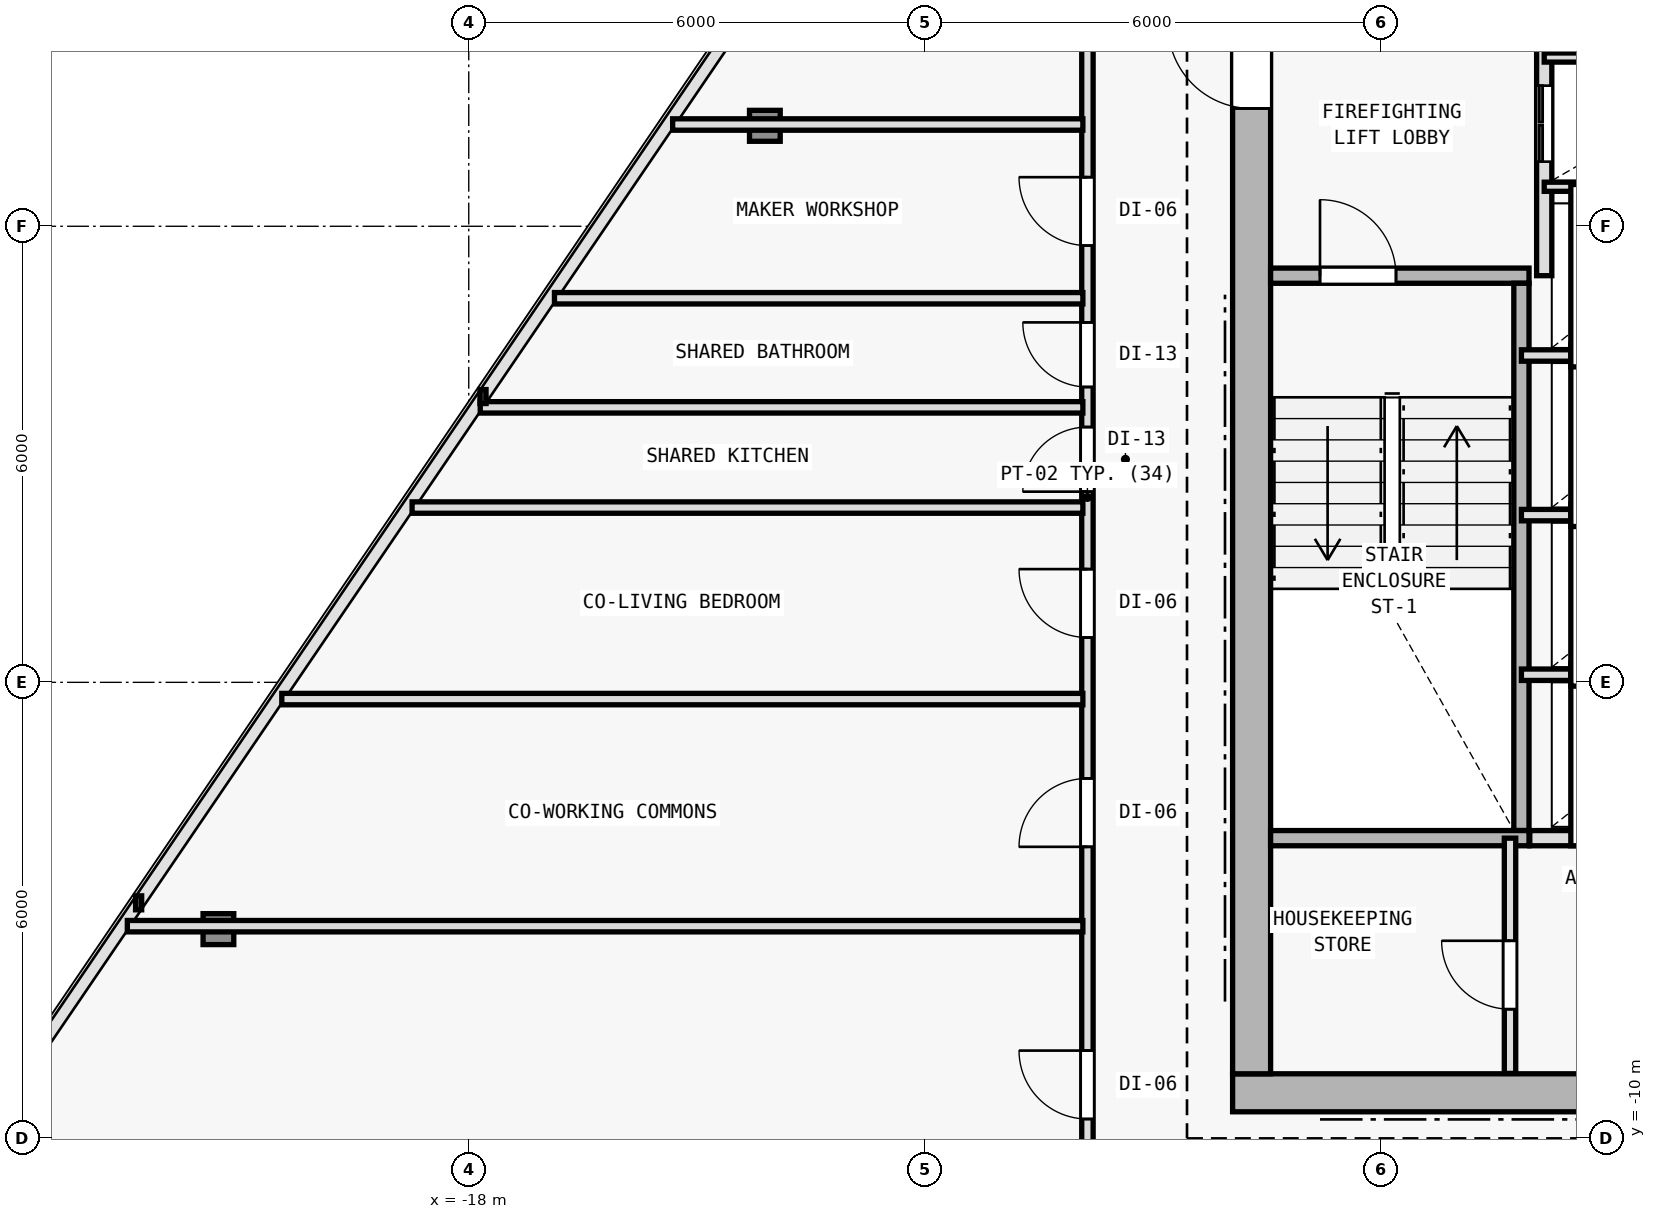
"""IFC4 building model, lengths in metres.
Left out: names, types, materials, properties, quantities, classifications, styles, units other than length and angle.
Written with IfcOpenShell. Run it as: python <this file> out.ifc"""

import sys

from ifc_helpers import new_model, si_unit, direction, frame, frame_2d, origin, origin_2d, place, context, subcontext, project, spatial, rectangle, i_section, extrude, element, fill, save


model = new_model("IFC4")
c1 = context("Model", 3, precision=1e-05, world=origin(), true_north=direction((0.0, 1.0)))
c2 = subcontext(c1, "Body", "Model", "MODEL_VIEW")
j1 = project(units=[si_unit("LENGTHUNIT", "METRE"), si_unit("PLANEANGLEUNIT", "RADIAN")], contexts=[c1])
p1 = place(None, origin())
s1 = spatial("IfcSite", under=j1, at=p1, CompositionType="ELEMENT")
p2 = place(p1, origin())
s2 = spatial("IfcBuilding", under=s1, at=p2, CompositionType="ELEMENT")
p3 = place(p2, frame((0.0, 0.0, 153.0)))
s3 = spatial("IfcBuildingStorey", under=s2, at=p3, CompositionType="ELEMENT", Elevation=153.0)
for number, where, z_axis, x_axis in (
    (1, (-7.7, -9.4, 0.0), (0.0, 0.0, 1.0), (1.0, 0.0, 0.0)),
    (2, (-7.7, 2.0, 0.0), (0.0, 0.0, 1.0), (1.0, 0.0, 0.0)),
):
    element("IfcColumn", number, at=place(p3, frame(where, z_axis=z_axis, x_axis=x_axis)), inside=s3, PredefinedType="COLUMN", context=c2, shape_type="SweptSolid", body=[
        extrude(i_section(OverallWidth=0.404, OverallDepth=0.407, WebThickness=0.017, FlangeThickness=0.028, FilletRadius=0.015, at=origin_2d()), origin(), (0.0, 0.0, 1.0), 3.6),
    ])
p4 = place(p3, frame((-14.104, 3.322, 0.006), z_axis=(0.017003572908, 0.009522000828, 0.999810086971), x_axis=(-0.488603368932, 0.87250601595, 0.0)))
e3 = element("IfcColumn", 3, at=p4, inside=s3, PredefinedType="COLUMN", context=c2, shape_type="SweptSolid", body=[
    extrude(i_section(OverallWidth=0.404, OverallDepth=0.407, WebThickness=0.017, FlangeThickness=0.028, FilletRadius=0.015, at=origin_2d()), origin(), (0.0, 0.0, 1.0), 3.59),
])
p5 = place(p3, frame((-21.294, -7.247, 0.006), z_axis=(0.025292109804, 0.02162067451, 0.999446274502), x_axis=(-0.649781149204, 0.760121344352, 0.0)))
e4 = element("IfcColumn", 4, at=p5, inside=s3, PredefinedType="COLUMN", context=c2, shape_type="SweptSolid", body=[
    extrude(i_section(OverallWidth=0.404, OverallDepth=0.407, WebThickness=0.017, FlangeThickness=0.028, FilletRadius=0.015, at=origin_2d()), origin(), (0.0, 0.0, 1.0), 3.591),
])
p6 = place(p3, frame((-7.95, -9.4, 0.0), z_axis=(0.0, 0.0, 1.0), x_axis=(1.0, 0.0, 0.0)))
e5 = element("IfcWall", 5, at=p6, inside=s3, PredefinedType="SHEAR", context=c2, shape_type="SweptSolid", body=[
    extrude(rectangle(XDim=15.9, YDim=0.5, at=frame_2d((7.95, 0.0))), origin(), (0.0, 0.0, 1.0), 3.35),
])
p7 = place(p6, frame((9.6, 0.0, 0.0)))
e6 = element("IfcOpeningElement", 6, at=p7, cuts=e5, PredefinedType="OPENING", context=c2, shape_type="SweptSolid", body=[
    extrude(rectangle(XDim=1.5, YDim=2.2, at=frame_2d((0.75, 1.1))), frame((0.0, 0.26, 0.0), z_axis=(0.0, -1.0, 0.0), x_axis=(1.0, 0.0, 0.0)), (0.0, 0.0, 1.0), 0.52),
])
p8 = place(p3, frame((-7.7, -9.15, 0.0), z_axis=(0.0, 0.0, 1.0), x_axis=(0.0, 1.0, 0.0)))
e7 = element("IfcWall", 7, at=p8, inside=s3, PredefinedType="SHEAR", context=c2, shape_type="SweptSolid", body=[
    extrude(rectangle(XDim=19.1, YDim=0.5, at=frame_2d((9.55, 0.0))), origin(), (0.0, 0.0, 1.0), 3.35),
])
p9 = place(p8, frame((12.7, 0.0, 0.0)))
e8 = element("IfcOpeningElement", 8, at=p9, cuts=e7, PredefinedType="OPENING", context=c2, shape_type="SweptSolid", body=[
    extrude(rectangle(XDim=1.1, YDim=2.15, at=frame_2d((0.55, 1.075))), frame((0.0, 0.26, 0.0), z_axis=(0.0, -1.0, 0.0), x_axis=(1.0, 0.0, 0.0)), (0.0, 0.0, 1.0), 0.52),
])
p10 = place(p3, frame((-7.45, 1.35, 0.0), z_axis=(0.0, 0.0, 1.0), x_axis=(1.0, 0.0, 0.0)))
e9 = element("IfcWall", 9, at=p10, inside=s3, PredefinedType="SOLIDWALL", context=c2, shape_type="SweptSolid", body=[
    extrude(rectangle(XDim=3.4, YDim=0.2, at=frame_2d((1.7, 0.0))), origin(), (0.0, 0.0, 1.0), 3.35),
])
p11 = place(p10, frame((0.65, 0.0, 0.0)))
e10 = element("IfcOpeningElement", 10, at=p11, cuts=e9, PredefinedType="OPENING", context=c2, shape_type="SweptSolid", body=[
    extrude(rectangle(XDim=1.0, YDim=2.15, at=frame_2d((0.5, 1.075))), frame((0.0, 0.11, 0.0), z_axis=(0.0, -1.0, 0.0), x_axis=(1.0, 0.0, 0.0)), (0.0, 0.0, 1.0), 0.22),
])
p12 = place(p3, frame((-4.15, -5.95, 0.0), z_axis=(0.0, 0.0, 1.0), x_axis=(0.0, 1.0, 0.0)))
e11 = element("IfcWall", 11, at=p12, inside=s3, PredefinedType="SOLIDWALL", context=c2, shape_type="SweptSolid", body=[
    extrude(rectangle(XDim=7.2, YDim=0.2, at=frame_2d((3.6, 0.0))), origin(), (0.0, 0.0, 1.0), 3.35),
])
p13 = place(p3, frame((-3.85, 1.35, 0.0), z_axis=(0.0, 0.0, 1.0), x_axis=(0.0, 1.0, 0.0)))
e12 = element("IfcWall", 12, at=p13, inside=s3, PredefinedType="SOLIDWALL", context=c2, shape_type="SweptSolid", body=[
    extrude(rectangle(XDim=8.595, YDim=0.2, at=frame_2d((4.297, 0.0))), origin(), (0.0, 0.0, 1.0), 3.35),
])
p14 = place(p13, frame((1.5, 0.0, 0.0)))
e13 = element("IfcOpeningElement", 13, at=p14, cuts=e12, PredefinedType="OPENING", context=c2, shape_type="SweptSolid", body=[
    extrude(rectangle(XDim=1.0, YDim=2.15, at=frame_2d((0.5, 1.075))), frame((0.0, 0.11, 0.0), z_axis=(0.0, -1.0, 0.0), x_axis=(1.0, 0.0, 0.0)), (0.0, 0.0, 1.0), 0.22),
])
p15 = place(p13, frame((3.18, 0.0, 0.0)))
e14 = element("IfcOpeningElement", 14, at=p15, cuts=e12, PredefinedType="OPENING", context=c2, shape_type="SweptSolid", body=[
    extrude(rectangle(XDim=1.0, YDim=2.15, at=frame_2d((0.5, 1.075))), frame((0.0, 0.11, 0.0), z_axis=(0.0, -1.0, 0.0), x_axis=(1.0, 0.0, 0.0)), (0.0, 0.0, 1.0), 0.22),
])
for number, where, z_axis, x_axis in (
    (15, (-3.85, 2.52, 0.0), (0.0, 0.0, 1.0), (1.0, 0.0, 0.0)),
    (16, (-3.85, 4.22, 0.0), (0.0, 0.0, 1.0), (1.0, 0.0, 0.0)),
):
    element("IfcWall", number, at=place(p3, frame(where, z_axis=z_axis, x_axis=x_axis)), inside=s3, PredefinedType="PARTITIONING", context=c2, shape_type="SweptSolid", body=[
        extrude(rectangle(XDim=2.9, YDim=0.12, at=frame_2d((1.45, 0.0))), origin(), (0.0, 0.0, 1.0), 3.35),
    ])
for number, where, z_axis, x_axis in (
    (17, (-4.15, -3.9, 0.0), (0.0, 0.0, 1.0), (1.0, 0.0, 0.0)),
    (18, (-4.15, -1.8, 0.0), (0.0, 0.0, 1.0), (1.0, 0.0, 0.0)),
    (19, (-4.15, 0.3, 0.0), (0.0, 0.0, 1.0), (1.0, 0.0, 0.0)),
):
    element("IfcWall", number, at=place(p3, frame(where, z_axis=z_axis, x_axis=x_axis)), inside=s3, PredefinedType="PARTITIONING", context=c2, shape_type="SweptSolid", body=[
        extrude(rectangle(XDim=2.9, YDim=0.15, at=frame_2d((1.45, 0.0))), origin(), (0.0, 0.0, 1.0), 3.35),
    ])
p16 = place(p3, frame((-7.45, -6.05, 0.0), z_axis=(0.0, 0.0, 1.0), x_axis=(1.0, 0.0, 0.0)))
e20 = element("IfcWall", 20, at=p16, inside=s3, PredefinedType="SOLIDWALL", context=c2, shape_type="SweptSolid", body=[
    extrude(rectangle(XDim=3.4, YDim=0.2, at=frame_2d((1.7, 0.0))), origin(), (0.0, 0.0, 1.0), 3.35),
])
p17 = place(p3, frame((-4.04, -6.05, 0.0), z_axis=(0.0, 0.0, 1.0), x_axis=(1.0, 0.0, 0.0)))
e21 = element("IfcWall", 21, at=p17, inside=s3, PredefinedType="SOLIDWALL", context=c2, shape_type="SweptSolid", body=[
    extrude(rectangle(XDim=2.79, YDim=0.2, at=frame_2d((1.395, 0.0))), origin(), (0.0, 0.0, 1.0), 3.35),
])
p18 = place(p3, frame((-4.3, -9.145, 0.0), z_axis=(0.0, 0.0, 1.0), x_axis=(0.0, 1.0, 0.0)))
e22 = element("IfcWall", 22, at=p18, inside=s3, PredefinedType="PARTITIONING", context=c2, shape_type="SweptSolid", body=[
    extrude(rectangle(XDim=3.095, YDim=0.15, at=frame_2d((1.547, 0.0))), origin(), (0.0, 0.0, 1.0), 3.35),
])
p19 = place(p18, frame((0.845, 0.0, 0.0)))
e23 = element("IfcOpeningElement", 23, at=p19, cuts=e22, PredefinedType="OPENING", context=c2, shape_type="SweptSolid", body=[
    extrude(rectangle(XDim=0.9, YDim=2.1, at=frame_2d((0.45, 1.05))), frame((0.0, 0.085, 0.0), z_axis=(0.0, -1.0, 0.0), x_axis=(1.0, 0.0, 0.0)), (0.0, 0.0, 1.0), 0.17),
])
p20 = place(p3, frame((-9.86, -11.56, 0.0), z_axis=(0.0, 0.0, 1.0), x_axis=(0.0, 1.0, 0.0)))
e24 = element("IfcWall", 24, at=p20, inside=s3, PredefinedType="PARTITIONING", context=c2, shape_type="SweptSolid", body=[
    extrude(rectangle(XDim=19.986, YDim=0.15, at=frame_2d((9.993, 0.0))), origin(), (0.0, 0.0, 1.0), 2.775),
])
p21 = place(p20, frame((11.446, 0.0, 0.0)))
e25 = element("IfcOpeningElement", 25, at=p21, cuts=e24, PredefinedType="OPENING", context=c2, shape_type="SweptSolid", body=[
    extrude(rectangle(XDim=0.85, YDim=2.1, at=frame_2d((0.425, 1.05))), frame((0.0, 0.085, 0.0), z_axis=(0.0, -1.0, 0.0), x_axis=(1.0, 0.0, 0.0)), (0.0, 0.0, 1.0), 0.17),
])
p22 = place(p20, frame((10.069, 0.0, 0.0)))
e26 = element("IfcOpeningElement", 26, at=p22, cuts=e24, PredefinedType="OPENING", context=c2, shape_type="SweptSolid", body=[
    extrude(rectangle(XDim=0.85, YDim=2.1, at=frame_2d((0.425, 1.05))), frame((0.0, 0.085, 0.0), z_axis=(0.0, -1.0, 0.0), x_axis=(1.0, 0.0, 0.0)), (0.0, 0.0, 1.0), 0.17),
])
p23 = place(p20, frame((8.15, 0.0, 0.0)))
e27 = element("IfcOpeningElement", 27, at=p23, cuts=e24, PredefinedType="OPENING", context=c2, shape_type="SweptSolid", body=[
    extrude(rectangle(XDim=0.9, YDim=2.1, at=frame_2d((0.45, 1.05))), frame((0.0, 0.085, 0.0), z_axis=(0.0, -1.0, 0.0), x_axis=(1.0, 0.0, 0.0)), (0.0, 0.0, 1.0), 0.17),
])
p24 = place(p20, frame((5.396, 0.0, 0.0)))
e28 = element("IfcOpeningElement", 28, at=p24, cuts=e24, PredefinedType="OPENING", context=c2, shape_type="SweptSolid", body=[
    extrude(rectangle(XDim=0.9, YDim=2.1, at=frame_2d((0.45, 1.05))), frame((0.0, 0.085, 0.0), z_axis=(0.0, -1.0, 0.0), x_axis=(1.0, 0.0, 0.0)), (0.0, 0.0, 1.0), 0.17),
])
p25 = place(p20, frame((1.815, 0.0, 0.0)))
e29 = element("IfcOpeningElement", 29, at=p25, cuts=e24, PredefinedType="OPENING", context=c2, shape_type="SweptSolid", body=[
    extrude(rectangle(XDim=0.9, YDim=2.1, at=frame_2d((0.45, 1.05))), frame((0.0, 0.085, 0.0), z_axis=(0.0, -1.0, 0.0), x_axis=(1.0, 0.0, 0.0)), (0.0, 0.0, 1.0), 0.17),
])
p26 = place(p20, frame((13.306, 0.0, 0.0)))
e30 = element("IfcOpeningElement", 30, at=p26, cuts=e24, PredefinedType="OPENING", context=c2, shape_type="SweptSolid", body=[
    extrude(rectangle(XDim=0.9, YDim=2.1, at=frame_2d((0.45, 1.05))), frame((0.0, 0.085, 0.0), z_axis=(0.0, -1.0, 0.0), x_axis=(1.0, 0.0, 0.0)), (0.0, 0.0, 1.0), 0.17),
])
p27 = place(p3, frame((-9.92, 3.339, 0.0), z_axis=(0.0, 0.0, 1.0), x_axis=(-1.0, 0.0, 0.0)))
e31 = element("IfcWall", 31, at=p27, inside=s3, PredefinedType="PARTITIONING", context=c2, shape_type="SweptSolid", body=[
    extrude(rectangle(XDim=5.397, YDim=0.15, at=frame_2d((2.699, 0.0))), origin(), (0.0, 0.0, 1.0), 2.885),
])
p28 = place(p3, frame((-9.92, -7.208, 0.0), z_axis=(0.0, 0.0, 1.0), x_axis=(-1.0, 0.0, 0.0)))
e32 = element("IfcWall", 32, at=p28, inside=s3, PredefinedType="PARTITIONING", context=c2, shape_type="SweptSolid", body=[
    extrude(rectangle(XDim=12.572, YDim=0.15, at=frame_2d((6.286, 0.0))), origin(), (0.0, 0.0, 1.0), 2.775),
])
p29 = place(p3, frame((-9.92, -1.701, 0.0), z_axis=(0.0, 0.0, 1.0), x_axis=(-1.0, 0.0, 0.0)))
e33 = element("IfcWall", 33, at=p29, inside=s3, PredefinedType="PARTITIONING", context=c2, shape_type="SweptSolid", body=[
    extrude(rectangle(XDim=8.826, YDim=0.15, at=frame_2d((4.413, 0.0))), origin(), (0.0, 0.0, 1.0), 2.885),
])
p30 = place(p3, frame((-9.92, -4.22, 0.0), z_axis=(0.0, 0.0, 1.0), x_axis=(-1.0, 0.0, 0.0)))
e34 = element("IfcWall", 34, at=p30, inside=s3, PredefinedType="PARTITIONING", context=c2, shape_type="SweptSolid", body=[
    extrude(rectangle(XDim=10.54, YDim=0.15, at=frame_2d((5.27, 0.0))), origin(), (0.0, 0.0, 1.0), 2.885),
])
p31 = place(p3, frame((-9.92, 1.053, 0.0), z_axis=(0.0, 0.0, 1.0), x_axis=(-1.0, 0.0, 0.0)))
e35 = element("IfcWall", 35, at=p31, inside=s3, PredefinedType="PARTITIONING", context=c2, shape_type="SweptSolid", body=[
    extrude(rectangle(XDim=6.952, YDim=0.15, at=frame_2d((3.476, 0.0))), origin(), (0.0, 0.0, 1.0), 2.885),
])
p32 = place(p3, frame((-9.92, -0.382, 0.0), z_axis=(0.0, 0.0, 1.0), x_axis=(-0.999999999526, -3.0791969e-05, 0.0)))
e36 = element("IfcWall", 36, at=p32, inside=s3, PredefinedType="PARTITIONING", context=c2, shape_type="SweptSolid", body=[
    extrude(rectangle(XDim=7.929, YDim=0.15, at=frame_2d((3.964, 0.0))), origin(), (0.0, 0.0, 1.0), 2.885),
])
p33 = place(p9, origin())
e37 = element("IfcDoor", 37, at=p33, inside=s3, OperationType="SINGLE_SWING_RIGHT", PredefinedType="DOOR", context=c2, shape_type="SweptSolid", body=[
    extrude(rectangle(XDim=1.1, YDim=2.15, at=frame_2d((0.55, 1.075))), frame((0.0, 0.025, 0.0), z_axis=(0.0, -1.0, 0.0), x_axis=(1.0, 0.0, 0.0)), (0.0, 0.0, 1.0), 0.05),
])
fill(e8, e37)
p34 = place(p11, origin())
e38 = element("IfcDoor", 38, at=p34, inside=s3, OperationType="SINGLE_SWING_LEFT", PredefinedType="DOOR", context=c2, shape_type="SweptSolid", body=[
    extrude(rectangle(XDim=1.0, YDim=2.15, at=frame_2d((0.5, 1.075))), frame((0.0, 0.025, 0.0), z_axis=(0.0, -1.0, 0.0), x_axis=(1.0, 0.0, 0.0)), (0.0, 0.0, 1.0), 0.05),
])
fill(e10, e38)
p35 = place(p14, origin())
e39 = element("IfcDoor", 39, at=p35, inside=s3, OperationType="DOUBLE_DOOR_SLIDING", PredefinedType="DOOR", context=c2, shape_type="SweptSolid", body=[
    extrude(rectangle(XDim=1.0, YDim=2.15, at=frame_2d((0.5, 1.075))), frame((0.0, 0.025, 0.0), z_axis=(0.0, -1.0, 0.0), x_axis=(1.0, 0.0, 0.0)), (0.0, 0.0, 1.0), 0.05),
])
fill(e13, e39)
p36 = place(p19, origin())
e40 = element("IfcDoor", 40, at=p36, inside=s3, OperationType="SINGLE_SWING_RIGHT", PredefinedType="DOOR", context=c2, shape_type="SweptSolid", body=[
    extrude(rectangle(XDim=0.9, YDim=2.1, at=frame_2d((0.45, 1.05))), frame((0.0, 0.025, 0.0), z_axis=(0.0, -1.0, 0.0), x_axis=(1.0, 0.0, 0.0)), (0.0, 0.0, 1.0), 0.05),
])
fill(e23, e40)
p37 = place(p21, origin())
e41 = element("IfcDoor", 41, at=p37, inside=s3, OperationType="SINGLE_SWING_RIGHT", PredefinedType="DOOR", context=c2, shape_type="SweptSolid", body=[
    extrude(rectangle(XDim=0.85, YDim=2.1, at=frame_2d((0.425, 1.05))), frame((0.0, 0.025, 0.0), z_axis=(0.0, -1.0, 0.0), x_axis=(1.0, 0.0, 0.0)), (0.0, 0.0, 1.0), 0.05),
])
fill(e25, e41)
p38 = place(p22, origin())
e42 = element("IfcDoor", 42, at=p38, inside=s3, OperationType="SINGLE_SWING_LEFT", PredefinedType="DOOR", context=c2, shape_type="SweptSolid", body=[
    extrude(rectangle(XDim=0.85, YDim=2.1, at=frame_2d((0.425, 1.05))), frame((0.0, 0.025, 0.0), z_axis=(0.0, -1.0, 0.0), x_axis=(1.0, 0.0, 0.0)), (0.0, 0.0, 1.0), 0.05),
])
fill(e26, e42)
p39 = place(p23, origin())
e43 = element("IfcDoor", 43, at=p39, inside=s3, OperationType="SINGLE_SWING_RIGHT", PredefinedType="DOOR", context=c2, shape_type="SweptSolid", body=[
    extrude(rectangle(XDim=0.9, YDim=2.1, at=frame_2d((0.45, 1.05))), frame((0.0, 0.025, 0.0), z_axis=(0.0, -1.0, 0.0), x_axis=(1.0, 0.0, 0.0)), (0.0, 0.0, 1.0), 0.05),
])
fill(e27, e43)
p40 = place(p24, origin())
e44 = element("IfcDoor", 44, at=p40, inside=s3, OperationType="SINGLE_SWING_LEFT", PredefinedType="DOOR", context=c2, shape_type="SweptSolid", body=[
    extrude(rectangle(XDim=0.9, YDim=2.1, at=frame_2d((0.45, 1.05))), frame((0.0, 0.025, 0.0), z_axis=(0.0, -1.0, 0.0), x_axis=(1.0, 0.0, 0.0)), (0.0, 0.0, 1.0), 0.05),
])
fill(e28, e44)
p41 = place(p25, origin())
e45 = element("IfcDoor", 45, at=p41, inside=s3, OperationType="SINGLE_SWING_RIGHT", PredefinedType="DOOR", context=c2, shape_type="SweptSolid", body=[
    extrude(rectangle(XDim=0.9, YDim=2.1, at=frame_2d((0.45, 1.05))), frame((0.0, 0.025, 0.0), z_axis=(0.0, -1.0, 0.0), x_axis=(1.0, 0.0, 0.0)), (0.0, 0.0, 1.0), 0.05),
])
fill(e29, e45)
p42 = place(p26, origin())
e46 = element("IfcDoor", 46, at=p42, inside=s3, OperationType="SINGLE_SWING_RIGHT", PredefinedType="DOOR", context=c2, shape_type="SweptSolid", body=[
    extrude(rectangle(XDim=0.9, YDim=2.1, at=frame_2d((0.45, 1.05))), frame((0.0, 0.025, 0.0), z_axis=(0.0, -1.0, 0.0), x_axis=(1.0, 0.0, 0.0)), (0.0, 0.0, 1.0), 0.05),
])
fill(e30, e46)
save(model, sys.argv[1])
